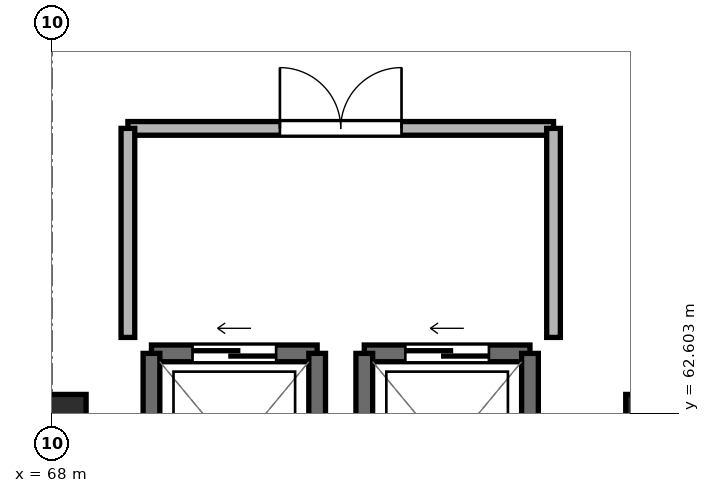
"""IFC4 building model, lengths in metres.
Left out: names, types, materials, properties, quantities, classifications, styles, units other than length and angle.
Written with IfcOpenShell. Run it as: python <this file> out.ifc"""

import sys

from ifc_helpers import new_model, si_unit, direction, frame, frame_2d, origin, origin_2d, place, context, subcontext, project, spatial, rectangle, extrude, element, fill, save


model = new_model("IFC4")
c1 = context("Model", 3, precision=1e-05, world=origin(), true_north=direction((0.0, 1.0)))
c2 = subcontext(c1, "Body", "Model", "MODEL_VIEW")
j1 = project(units=[si_unit("LENGTHUNIT", "METRE"), si_unit("PLANEANGLEUNIT", "RADIAN")], contexts=[c1])
p1 = place(None, origin())
s1 = spatial("IfcSite", under=j1, at=p1, CompositionType="ELEMENT")
p2 = place(p1, origin())
s2 = spatial("IfcBuilding", under=s1, at=p2, CompositionType="ELEMENT")
p3 = place(p2, frame((0.0, 0.0, 27.55)))
s3 = spatial("IfcBuildingStorey", under=s2, at=p3, CompositionType="ELEMENT", Elevation=27.55)
for number, where, z_axis, x_axis in (
    (1, (68.0, 62.4, -0.26), (0.0, 0.0, 1.0), (1.0, 0.0, 0.0)),
    (2, (76.0, 62.4, -0.26), (0.0, 0.0, 1.0), (1.0, 0.0, 0.0)),
):
    element("IfcColumn", number, at=place(p3, frame(where, z_axis=z_axis, x_axis=x_axis)), inside=s3, PredefinedType="COLUMN", context=c2, shape_type="SweptSolid", body=[
        extrude(rectangle(XDim=0.9, YDim=0.9, at=origin_2d()), origin(), (0.0, 0.0, 1.0), 3.25),
    ])
p4 = place(p3, frame((71.49, 63.39, 0.0), z_axis=(0.0, 0.0, 1.0), x_axis=(-1.0, 0.0, 0.0)))
e3 = element("IfcWall", 3, at=p4, inside=s3, PredefinedType="SHEAR", context=c2, shape_type="SweptSolid", body=[
    extrude(rectangle(XDim=2.18, YDim=0.22, at=frame_2d((1.09, 0.0))), origin(), (0.0, 0.0, 1.0), 2.99),
])
p5 = place(p4, frame((0.54, 0.0, 0.0)))
e4 = element("IfcOpeningElement", 4, at=p5, cuts=e3, PredefinedType="OPENING", context=c2, shape_type="SweptSolid", body=[
    extrude(rectangle(XDim=1.1, YDim=2.2, at=frame_2d((0.55, 1.1))), frame((0.0, 0.122, 0.0), z_axis=(0.0, -1.0, 0.0), x_axis=(1.0, 0.0, 0.0)), (0.0, 0.0, 1.0), 0.244),
])
for number, where, z_axis, x_axis in (
    (5, (69.31, 63.39, 0.0), (0.0, 0.0, 1.0), (0.0, -1.0, 0.0)),
    (6, (71.49, 60.81, 0.0), (0.0, 0.0, 1.0), (0.0, 1.0, 0.0)),
):
    element("IfcWall", number, at=place(p3, frame(where, z_axis=z_axis, x_axis=x_axis)), inside=s3, PredefinedType="SHEAR", context=c2, shape_type="SweptSolid", body=[
        extrude(rectangle(XDim=2.58, YDim=0.22, at=frame_2d((1.29, 0.0))), origin(), (0.0, 0.0, 1.0), 2.99),
    ])
p6 = place(p3, frame((74.29, 63.39, 0.0), z_axis=(0.0, 0.0, 1.0), x_axis=(-1.0, 0.0, 0.0)))
e7 = element("IfcWall", 7, at=p6, inside=s3, PredefinedType="SHEAR", context=c2, shape_type="SweptSolid", body=[
    extrude(rectangle(XDim=2.18, YDim=0.22, at=frame_2d((1.09, 0.0))), origin(), (0.0, 0.0, 1.0), 2.99),
])
p7 = place(p6, frame((0.54, 0.0, 0.0)))
e8 = element("IfcOpeningElement", 8, at=p7, cuts=e7, PredefinedType="OPENING", context=c2, shape_type="SweptSolid", body=[
    extrude(rectangle(XDim=1.1, YDim=2.2, at=frame_2d((0.55, 1.1))), frame((0.0, 0.122, 0.0), z_axis=(0.0, -1.0, 0.0), x_axis=(1.0, 0.0, 0.0)), (0.0, 0.0, 1.0), 0.244),
])
for number, where, z_axis, x_axis in (
    (9, (72.11, 63.39, 0.0), (0.0, 0.0, 1.0), (0.0, -1.0, 0.0)),
    (10, (74.29, 60.81, 0.0), (0.0, 0.0, 1.0), (0.0, 1.0, 0.0)),
):
    element("IfcWall", number, at=place(p3, frame(where, z_axis=z_axis, x_axis=x_axis)), inside=s3, PredefinedType="SHEAR", context=c2, shape_type="SweptSolid", body=[
        extrude(rectangle(XDim=2.58, YDim=0.22, at=frame_2d((1.29, 0.0))), origin(), (0.0, 0.0, 1.0), 2.99),
    ])
p8 = place(p3, frame((69.0, 66.35, 0.0), z_axis=(0.0, 0.0, 1.0), x_axis=(1.0, 0.0, 0.0)))
e11 = element("IfcWall", 11, at=p8, inside=s3, PredefinedType="PARTITIONING", context=c2, shape_type="SweptSolid", body=[
    extrude(rectangle(XDim=5.6, YDim=0.18, at=frame_2d((2.8, 0.0))), origin(), (0.0, 0.0, 1.0), 2.53),
])
p9 = place(p8, frame((2.0, 0.0, 0.0)))
e12 = element("IfcOpeningElement", 12, at=p9, cuts=e11, PredefinedType="OPENING", context=c2, shape_type="SweptSolid", body=[
    extrude(rectangle(XDim=1.6, YDim=2.2, at=frame_2d((0.8, 1.1))), frame((0.0, 0.102, 0.0), z_axis=(0.0, -1.0, 0.0), x_axis=(1.0, 0.0, 0.0)), (0.0, 0.0, 1.0), 0.204),
])
for number, where, z_axis, x_axis in (
    (13, (69.0, 63.6, 0.0), (0.0, 0.0, 1.0), (0.0, 1.0, 0.0)),
    (14, (74.6, 63.6, 0.0), (0.0, 0.0, 1.0), (0.0, 1.0, 0.0)),
):
    element("IfcWall", number, at=place(p3, frame(where, z_axis=z_axis, x_axis=x_axis)), inside=s3, PredefinedType="PARTITIONING", context=c2, shape_type="SweptSolid", body=[
        extrude(rectangle(XDim=2.75, YDim=0.18, at=frame_2d((1.375, 0.0))), origin(), (0.0, 0.0, 1.0), 2.53),
    ])
p10 = place(p5, origin())
e15 = element("IfcDoor", 15, at=p10, inside=s3, OperationType="SLIDING_TO_RIGHT", PredefinedType="DOOR", context=c2, shape_type="SweptSolid", body=[
    extrude(rectangle(XDim=1.1, YDim=2.2, at=frame_2d((0.55, 1.1))), frame((0.0, 0.025, 0.0), z_axis=(0.0, -1.0, 0.0), x_axis=(1.0, 0.0, 0.0)), (0.0, 0.0, 1.0), 0.05),
])
fill(e4, e15)
p11 = place(p7, origin())
e16 = element("IfcDoor", 16, at=p11, inside=s3, OperationType="SLIDING_TO_RIGHT", PredefinedType="DOOR", context=c2, shape_type="SweptSolid", body=[
    extrude(rectangle(XDim=1.1, YDim=2.2, at=frame_2d((0.55, 1.1))), frame((0.0, 0.025, 0.0), z_axis=(0.0, -1.0, 0.0), x_axis=(1.0, 0.0, 0.0)), (0.0, 0.0, 1.0), 0.05),
])
fill(e8, e16)
p12 = place(p9, origin())
e17 = element("IfcDoor", 17, at=p12, inside=s3, OperationType="DOUBLE_DOOR_SINGLE_SWING", PredefinedType="DOOR", context=c2, shape_type="SweptSolid", body=[
    extrude(rectangle(XDim=1.6, YDim=2.2, at=frame_2d((0.8, 1.1))), frame((0.0, 0.025, 0.0), z_axis=(0.0, -1.0, 0.0), x_axis=(1.0, 0.0, 0.0)), (0.0, 0.0, 1.0), 0.05),
])
fill(e12, e17)
save(model, sys.argv[1])
